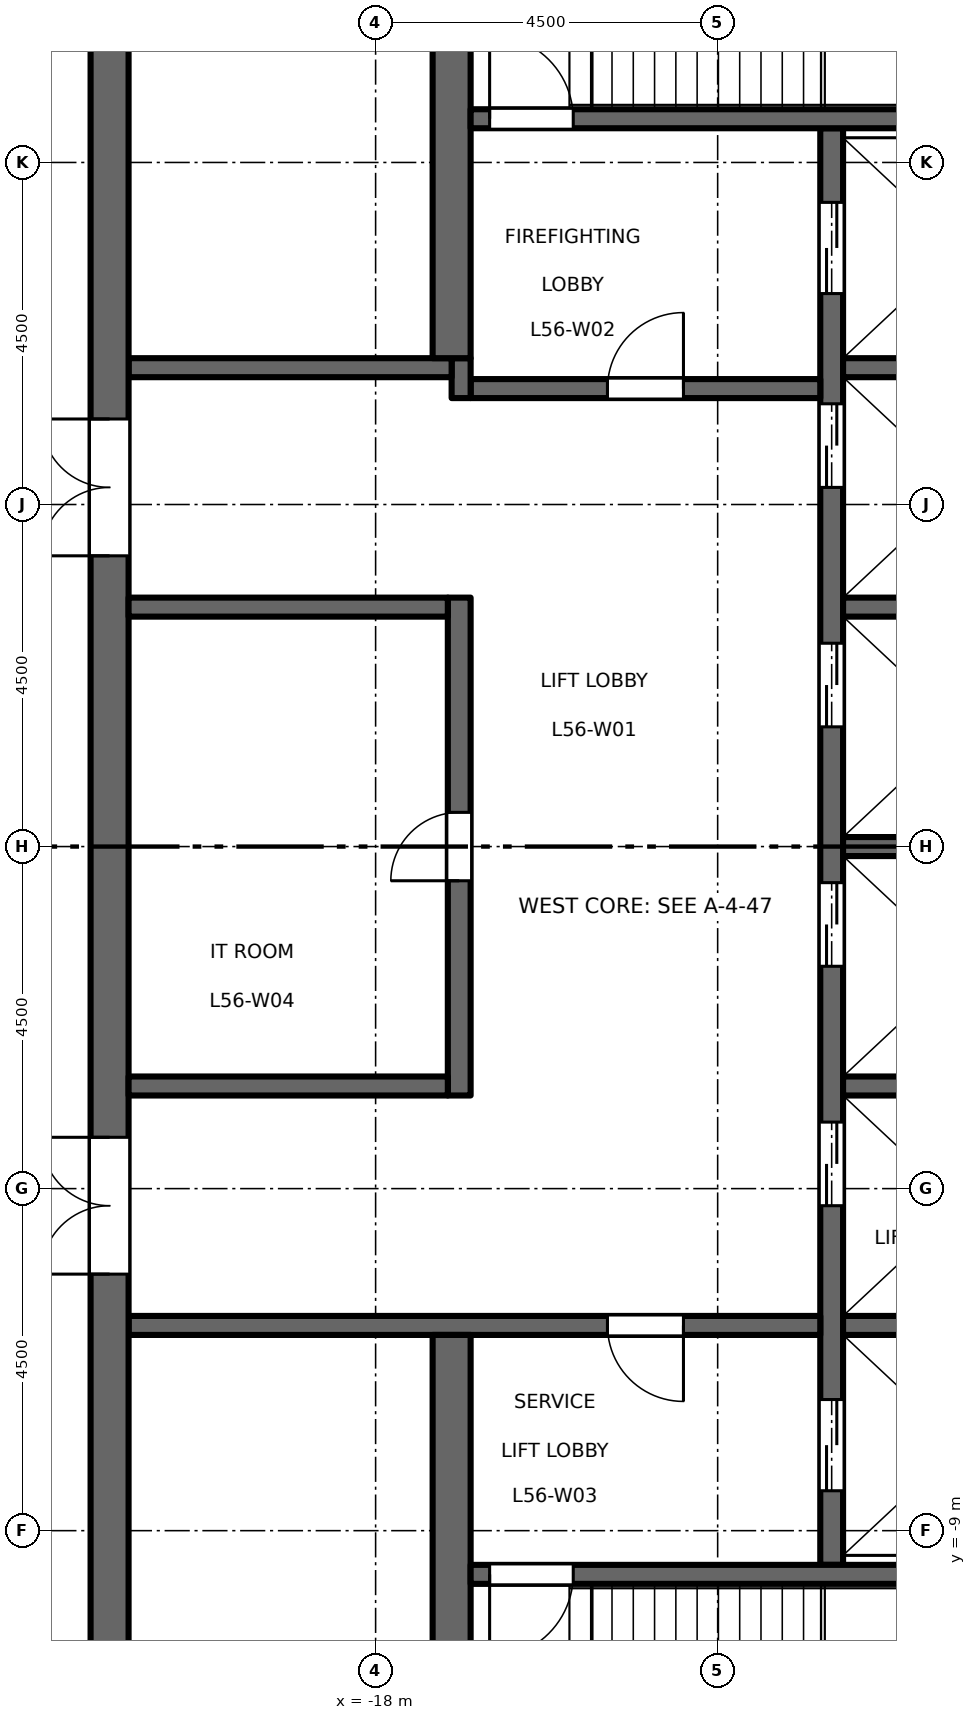
"""IFC4 building model, lengths in metres.
Left out: names, types, materials, properties, quantities, classifications, styles, units other than length and angle.
Written with IfcOpenShell. Run it as: python <this file> out.ifc"""

import sys

from ifc_helpers import new_model, si_unit, direction, frame, frame_2d, origin, place, context, subcontext, project, spatial, rectangle, extrude, element, fill, save


model = new_model("IFC4")
c1 = context("Model", 3, precision=1e-05, world=origin(), true_north=direction((0.0, 1.0)))
c2 = subcontext(c1, "Body", "Model", "MODEL_VIEW")
j1 = project(units=[si_unit("LENGTHUNIT", "METRE"), si_unit("PLANEANGLEUNIT", "RADIAN")], contexts=[c1])
p1 = place(None, origin())
s1 = spatial("IfcSite", under=j1, at=p1, CompositionType="ELEMENT")
p2 = place(p1, origin())
s2 = spatial("IfcBuilding", under=s1, at=p2, CompositionType="ELEMENT")
p3 = place(p2, frame((0.0, 0.0, 260.2)))
s3 = spatial("IfcBuildingStorey", under=s2, at=p3, CompositionType="ELEMENT", Elevation=260.2)
p4 = place(p3, frame((-12.0, -9.45, 0.0), z_axis=(0.0, 0.0, 1.0), x_axis=(0.0, 1.0, 0.0)))
e1 = element("IfcWall", 1, at=p4, inside=s3, PredefinedType="SHEAR", context=c2, shape_type="SweptSolid", body=[
    extrude(rectangle(XDim=18.9, YDim=0.3, at=frame_2d((9.45, 0.0))), origin(), (0.0, 0.0, 1.0), 4.35),
])
p5 = place(p4, frame((4.725, 0.0, 0.0)))
e2 = element("IfcOpeningElement", 2, at=p5, cuts=e1, PredefinedType="OPENING", context=c2, shape_type="SweptSolid", body=[
    extrude(rectangle(XDim=1.1, YDim=2.1, at=frame_2d((0.55, 1.05))), frame((0.0, 0.16, 0.0), z_axis=(0.0, -1.0, 0.0), x_axis=(1.0, 0.0, 0.0)), (0.0, 0.0, 1.0), 0.32),
])
p6 = place(p4, frame((7.875, 0.0, 0.0)))
e3 = element("IfcOpeningElement", 3, at=p6, cuts=e1, PredefinedType="OPENING", context=c2, shape_type="SweptSolid", body=[
    extrude(rectangle(XDim=1.1, YDim=2.1, at=frame_2d((0.55, 1.05))), frame((0.0, 0.16, 0.0), z_axis=(0.0, -1.0, 0.0), x_axis=(1.0, 0.0, 0.0)), (0.0, 0.0, 1.0), 0.32),
])
p7 = place(p4, frame((11.025, 0.0, 0.0)))
e4 = element("IfcOpeningElement", 4, at=p7, cuts=e1, PredefinedType="OPENING", context=c2, shape_type="SweptSolid", body=[
    extrude(rectangle(XDim=1.1, YDim=2.1, at=frame_2d((0.55, 1.05))), frame((0.0, 0.16, 0.0), z_axis=(0.0, -1.0, 0.0), x_axis=(1.0, 0.0, 0.0)), (0.0, 0.0, 1.0), 0.32),
])
p8 = place(p4, frame((14.175, 0.0, 0.0)))
e5 = element("IfcOpeningElement", 5, at=p8, cuts=e1, PredefinedType="OPENING", context=c2, shape_type="SweptSolid", body=[
    extrude(rectangle(XDim=1.1, YDim=2.1, at=frame_2d((0.55, 1.05))), frame((0.0, 0.16, 0.0), z_axis=(0.0, -1.0, 0.0), x_axis=(1.0, 0.0, 0.0)), (0.0, 0.0, 1.0), 0.32),
])
p9 = place(p4, frame((16.725, 0.0, 0.0)))
e6 = element("IfcOpeningElement", 6, at=p9, cuts=e1, PredefinedType="OPENING", context=c2, shape_type="SweptSolid", body=[
    extrude(rectangle(XDim=1.2, YDim=2.1, at=frame_2d((0.6, 1.05))), frame((0.0, 0.16, 0.0), z_axis=(0.0, -1.0, 0.0), x_axis=(1.0, 0.0, 0.0)), (0.0, 0.0, 1.0), 0.32),
])
p10 = place(p4, frame((0.975, 0.0, 0.0)))
e7 = element("IfcOpeningElement", 7, at=p10, cuts=e1, PredefinedType="OPENING", context=c2, shape_type="SweptSolid", body=[
    extrude(rectangle(XDim=1.2, YDim=2.1, at=frame_2d((0.6, 1.05))), frame((0.0, 0.16, 0.0), z_axis=(0.0, -1.0, 0.0), x_axis=(1.0, 0.0, 0.0)), (0.0, 0.0, 1.0), 0.32),
])
p11 = place(p3, frame((-12.15, 6.025, 0.0), z_axis=(0.0, 0.0, 1.0), x_axis=(-1.0, 0.0, 0.0)))
e8 = element("IfcWall", 8, at=p11, inside=s3, PredefinedType="SHEAR", context=c2, shape_type="SweptSolid", body=[
    extrude(rectangle(XDim=4.6, YDim=0.25, at=frame_2d((2.3, 0.0))), origin(), (0.0, 0.0, 1.0), 4.35),
])
p12 = place(p11, frame((1.8, 0.0, 0.0)))
e9 = element("IfcOpeningElement", 9, at=p12, cuts=e8, PredefinedType="OPENING", context=c2, shape_type="SweptSolid", body=[
    extrude(rectangle(XDim=1.0, YDim=2.1, at=frame_2d((0.5, 1.05))), frame((0.0, 0.135, 0.0), z_axis=(0.0, -1.0, 0.0), x_axis=(1.0, 0.0, 0.0)), (0.0, 0.0, 1.0), 0.27),
])
p13 = place(p3, frame((-16.875, 5.9, 0.0), z_axis=(0.0, 0.0, 1.0), x_axis=(0.0, 1.0, 0.0)))
e10 = element("IfcWall", 10, at=p13, inside=s3, PredefinedType="SHEAR", context=c2, shape_type="SweptSolid", body=[
    extrude(rectangle(XDim=0.525, YDim=0.25, at=frame_2d((0.263, 0.0))), origin(), (0.0, 0.0, 1.0), 4.35),
])
p14 = place(p3, frame((-17.0, 6.3, 0.0), z_axis=(0.0, 0.0, 1.0), x_axis=(-1.0, 0.0, 0.0)))
e11 = element("IfcWall", 11, at=p14, inside=s3, PredefinedType="SHEAR", context=c2, shape_type="SweptSolid", body=[
    extrude(rectangle(XDim=4.25, YDim=0.25, at=frame_2d((2.125, 0.0))), origin(), (0.0, 0.0, 1.0), 4.35),
])
p15 = place(p3, frame((-12.15, -6.3, 0.0), z_axis=(0.0, 0.0, 1.0), x_axis=(-1.0, 0.0, 0.0)))
e12 = element("IfcWall", 12, at=p15, inside=s3, PredefinedType="SHEAR", context=c2, shape_type="SweptSolid", body=[
    extrude(rectangle(XDim=9.1, YDim=0.25, at=frame_2d((4.55, 0.0))), origin(), (0.0, 0.0, 1.0), 4.35),
])
p16 = place(p15, frame((1.8, 0.0, 0.0)))
e13 = element("IfcOpeningElement", 13, at=p16, cuts=e12, PredefinedType="OPENING", context=c2, shape_type="SweptSolid", body=[
    extrude(rectangle(XDim=1.0, YDim=2.1, at=frame_2d((0.5, 1.05))), frame((0.0, 0.135, 0.0), z_axis=(0.0, -1.0, 0.0), x_axis=(1.0, 0.0, 0.0)), (0.0, 0.0, 1.0), 0.27),
])
p17 = place(p3, frame((-21.5, -13.0, 0.0), z_axis=(0.0, 0.0, 1.0), x_axis=(0.0, 1.0, 0.0)))
e14 = element("IfcWall", 14, at=p17, inside=s3, PredefinedType="SHEAR", context=c2, shape_type="SweptSolid", body=[
    extrude(rectangle(XDim=26.0, YDim=0.5, at=frame_2d((13.0, 0.0))), origin(), (0.0, 0.0, 1.0), 4.35),
])
p18 = place(p17, frame((16.825, 0.0, 0.0)))
e15 = element("IfcOpeningElement", 15, at=p18, cuts=e14, PredefinedType="OPENING", context=c2, shape_type="SweptSolid", body=[
    extrude(rectangle(XDim=1.8, YDim=2.1, at=frame_2d((0.9, 1.05))), frame((0.0, 0.26, 0.0), z_axis=(0.0, -1.0, 0.0), x_axis=(1.0, 0.0, 0.0)), (0.0, 0.0, 1.0), 0.52),
])
p19 = place(p17, frame((7.375, 0.0, 0.0)))
e16 = element("IfcOpeningElement", 16, at=p19, cuts=e14, PredefinedType="OPENING", context=c2, shape_type="SweptSolid", body=[
    extrude(rectangle(XDim=1.8, YDim=2.1, at=frame_2d((0.9, 1.05))), frame((0.0, 0.26, 0.0), z_axis=(0.0, -1.0, 0.0), x_axis=(1.0, 0.0, 0.0)), (0.0, 0.0, 1.0), 0.52),
])
p20 = place(p3, frame((-16.9, -3.275, 0.0), z_axis=(0.0, 0.0, 1.0), x_axis=(0.0, 1.0, 0.0)))
e17 = element("IfcWall", 17, at=p20, inside=s3, PredefinedType="SHEAR", context=c2, shape_type="SweptSolid", body=[
    extrude(rectangle(XDim=6.55, YDim=0.3, at=frame_2d((3.275, 0.0))), origin(), (0.0, 0.0, 1.0), 4.35),
])
p21 = place(p20, frame((2.825, 0.0, 0.0)))
e18 = element("IfcOpeningElement", 18, at=p21, cuts=e17, PredefinedType="OPENING", context=c2, shape_type="SweptSolid", body=[
    extrude(rectangle(XDim=0.9, YDim=2.1, at=frame_2d((0.45, 1.05))), frame((0.0, 0.16, 0.0), z_axis=(0.0, -1.0, 0.0), x_axis=(1.0, 0.0, 0.0)), (0.0, 0.0, 1.0), 0.32),
])
for number, where, z_axis, x_axis in (
    (19, (-17.05, 3.15, 0.0), (0.0, 0.0, 1.0), (-1.0, 0.0, 0.0)),
    (20, (-17.05, -3.15, 0.0), (0.0, 0.0, 1.0), (-1.0, 0.0, 0.0)),
):
    element("IfcWall", number, at=place(p3, frame(where, z_axis=z_axis, x_axis=x_axis)), inside=s3, PredefinedType="SHEAR", context=c2, shape_type="SweptSolid", body=[
        extrude(rectangle(XDim=4.2, YDim=0.25, at=frame_2d((2.1, 0.0))), origin(), (0.0, 0.0, 1.0), 4.35),
    ])
for number, where, z_axis, x_axis in (
    (21, (-17.0, 6.425, 0.0), (0.0, 0.0, 1.0), (0.0, 1.0, 0.0)),
    (22, (-17.0, -13.0, 0.0), (0.0, 0.0, 1.0), (0.0, 1.0, 0.0)),
):
    element("IfcWall", number, at=place(p3, frame(where, z_axis=z_axis, x_axis=x_axis)), inside=s3, PredefinedType="SHEAR", context=c2, shape_type="SweptSolid", body=[
        extrude(rectangle(XDim=6.575, YDim=0.5, at=frame_2d((3.288, 0.0))), origin(), (0.0, 0.0, 1.0), 4.35),
    ])
for number, where, z_axis, x_axis in (
    (23, (-8.75, 0.0, 0.0), (0.0, 0.0, 1.0), (-1.0, 0.0, 0.0)),
    (24, (-8.75, 3.15, 0.0), (0.0, 0.0, 1.0), (-1.0, 0.0, 0.0)),
    (25, (-8.75, 6.3, 0.0), (0.0, 0.0, 1.0), (-1.0, 0.0, 0.0)),
    (26, (-8.75, -3.15, 0.0), (0.0, 0.0, 1.0), (-1.0, 0.0, 0.0)),
    (27, (-8.75, -6.3, 0.0), (0.0, 0.0, 1.0), (-1.0, 0.0, 0.0)),
):
    element("IfcWall", number, at=place(p3, frame(where, z_axis=z_axis, x_axis=x_axis)), inside=s3, PredefinedType="SHEAR", context=c2, shape_type="SweptSolid", body=[
        extrude(rectangle(XDim=3.1, YDim=0.25, at=frame_2d((1.55, 0.0))), origin(), (0.0, 0.0, 1.0), 4.35),
    ])
p22 = place(p3, frame((-8.75, 9.575, 0.0), z_axis=(0.0, 0.0, 1.0), x_axis=(-1.0, 0.0, 0.0)))
e28 = element("IfcWall", 28, at=p22, inside=s3, PredefinedType="SHEAR", context=c2, shape_type="SweptSolid", body=[
    extrude(rectangle(XDim=8.0, YDim=0.25, at=frame_2d((4.0, 0.0))), origin(), (0.0, 0.0, 1.0), 4.35),
])
p23 = place(p22, frame((6.65, 0.0, 0.0)))
e29 = element("IfcOpeningElement", 29, at=p23, cuts=e28, PredefinedType="OPENING", context=c2, shape_type="SweptSolid", body=[
    extrude(rectangle(XDim=1.1, YDim=2.1, at=frame_2d((0.55, 1.05))), frame((0.0, 0.135, 0.0), z_axis=(0.0, -1.0, 0.0), x_axis=(1.0, 0.0, 0.0)), (0.0, 0.0, 1.0), 0.27),
])
p24 = place(p3, frame((-8.75, -9.575, 0.0), z_axis=(0.0, 0.0, 1.0), x_axis=(-1.0, 0.0, 0.0)))
e30 = element("IfcWall", 30, at=p24, inside=s3, PredefinedType="SHEAR", context=c2, shape_type="SweptSolid", body=[
    extrude(rectangle(XDim=8.0, YDim=0.25, at=frame_2d((4.0, 0.0))), origin(), (0.0, 0.0, 1.0), 4.35),
])
p25 = place(p24, frame((6.65, 0.0, 0.0)))
e31 = element("IfcOpeningElement", 31, at=p25, cuts=e30, PredefinedType="OPENING", context=c2, shape_type="SweptSolid", body=[
    extrude(rectangle(XDim=1.1, YDim=2.1, at=frame_2d((0.55, 1.05))), frame((0.0, 0.135, 0.0), z_axis=(0.0, -1.0, 0.0), x_axis=(1.0, 0.0, 0.0)), (0.0, 0.0, 1.0), 0.27),
])
p26 = place(p12, origin())
e32 = element("IfcDoor", 32, at=p26, inside=s3, OperationType="SINGLE_SWING_LEFT", PredefinedType="DOOR", context=c2, shape_type="SweptSolid", body=[
    extrude(rectangle(XDim=1.0, YDim=2.1, at=frame_2d((0.5, 1.05))), frame((0.0, 0.025, 0.0), z_axis=(0.0, -1.0, 0.0), x_axis=(1.0, 0.0, 0.0)), (0.0, 0.0, 1.0), 0.05),
])
fill(e9, e32)
p27 = place(p16, origin())
e33 = element("IfcDoor", 33, at=p27, inside=s3, OperationType="SINGLE_SWING_RIGHT", PredefinedType="DOOR", context=c2, shape_type="SweptSolid", body=[
    extrude(rectangle(XDim=1.0, YDim=2.1, at=frame_2d((0.5, 1.05))), frame((0.0, 0.025, 0.0), z_axis=(0.0, -1.0, 0.0), x_axis=(1.0, 0.0, 0.0)), (0.0, 0.0, 1.0), 0.05),
])
fill(e13, e33)
p28 = place(p23, origin())
e34 = element("IfcDoor", 34, at=p28, inside=s3, OperationType="SINGLE_SWING_RIGHT", PredefinedType="DOOR", context=c2, shape_type="SweptSolid", body=[
    extrude(rectangle(XDim=1.1, YDim=2.1, at=frame_2d((0.55, 1.05))), frame((0.0, 0.025, 0.0), z_axis=(0.0, -1.0, 0.0), x_axis=(1.0, 0.0, 0.0)), (0.0, 0.0, 1.0), 0.05),
])
fill(e29, e34)
p29 = place(p25, origin())
e35 = element("IfcDoor", 35, at=p29, inside=s3, OperationType="SINGLE_SWING_LEFT", PredefinedType="DOOR", context=c2, shape_type="SweptSolid", body=[
    extrude(rectangle(XDim=1.1, YDim=2.1, at=frame_2d((0.55, 1.05))), frame((0.0, 0.025, 0.0), z_axis=(0.0, -1.0, 0.0), x_axis=(1.0, 0.0, 0.0)), (0.0, 0.0, 1.0), 0.05),
])
fill(e31, e35)
p30 = place(p18, origin())
e36 = element("IfcDoor", 36, at=p30, inside=s3, OperationType="DOUBLE_DOOR_DOUBLE_SWING", PredefinedType="DOOR", context=c2, shape_type="SweptSolid", body=[
    extrude(rectangle(XDim=1.8, YDim=2.1, at=frame_2d((0.9, 1.05))), frame((0.0, 0.025, 0.0), z_axis=(0.0, -1.0, 0.0), x_axis=(1.0, 0.0, 0.0)), (0.0, 0.0, 1.0), 0.05),
])
fill(e15, e36)
p31 = place(p19, origin())
e37 = element("IfcDoor", 37, at=p31, inside=s3, OperationType="DOUBLE_DOOR_DOUBLE_SWING", PredefinedType="DOOR", context=c2, shape_type="SweptSolid", body=[
    extrude(rectangle(XDim=1.8, YDim=2.1, at=frame_2d((0.9, 1.05))), frame((0.0, 0.025, 0.0), z_axis=(0.0, -1.0, 0.0), x_axis=(1.0, 0.0, 0.0)), (0.0, 0.0, 1.0), 0.05),
])
fill(e16, e37)
p32 = place(p5, origin())
e38 = element("IfcDoor", 38, at=p32, inside=s3, OperationType="DOUBLE_DOOR_SLIDING", PredefinedType="DOOR", context=c2, shape_type="SweptSolid", body=[
    extrude(rectangle(XDim=1.1, YDim=2.1, at=frame_2d((0.55, 1.05))), frame((0.0, 0.025, 0.0), z_axis=(0.0, -1.0, 0.0), x_axis=(1.0, 0.0, 0.0)), (0.0, 0.0, 1.0), 0.05),
])
fill(e2, e38)
p33 = place(p6, origin())
e39 = element("IfcDoor", 39, at=p33, inside=s3, OperationType="DOUBLE_DOOR_SLIDING", PredefinedType="DOOR", context=c2, shape_type="SweptSolid", body=[
    extrude(rectangle(XDim=1.1, YDim=2.1, at=frame_2d((0.55, 1.05))), frame((0.0, 0.025, 0.0), z_axis=(0.0, -1.0, 0.0), x_axis=(1.0, 0.0, 0.0)), (0.0, 0.0, 1.0), 0.05),
])
fill(e3, e39)
p34 = place(p7, origin())
e40 = element("IfcDoor", 40, at=p34, inside=s3, OperationType="DOUBLE_DOOR_SLIDING", PredefinedType="DOOR", context=c2, shape_type="SweptSolid", body=[
    extrude(rectangle(XDim=1.1, YDim=2.1, at=frame_2d((0.55, 1.05))), frame((0.0, 0.025, 0.0), z_axis=(0.0, -1.0, 0.0), x_axis=(1.0, 0.0, 0.0)), (0.0, 0.0, 1.0), 0.05),
])
fill(e4, e40)
p35 = place(p8, origin())
e41 = element("IfcDoor", 41, at=p35, inside=s3, OperationType="DOUBLE_DOOR_SLIDING", PredefinedType="DOOR", context=c2, shape_type="SweptSolid", body=[
    extrude(rectangle(XDim=1.1, YDim=2.1, at=frame_2d((0.55, 1.05))), frame((0.0, 0.025, 0.0), z_axis=(0.0, -1.0, 0.0), x_axis=(1.0, 0.0, 0.0)), (0.0, 0.0, 1.0), 0.05),
])
fill(e5, e41)
p36 = place(p9, origin())
e42 = element("IfcDoor", 42, at=p36, inside=s3, OperationType="DOUBLE_DOOR_SLIDING", PredefinedType="DOOR", context=c2, shape_type="SweptSolid", body=[
    extrude(rectangle(XDim=1.2, YDim=2.1, at=frame_2d((0.6, 1.05))), frame((0.0, 0.025, 0.0), z_axis=(0.0, -1.0, 0.0), x_axis=(1.0, 0.0, 0.0)), (0.0, 0.0, 1.0), 0.05),
])
fill(e6, e42)
p37 = place(p10, origin())
e43 = element("IfcDoor", 43, at=p37, inside=s3, OperationType="DOUBLE_DOOR_SLIDING", PredefinedType="DOOR", context=c2, shape_type="SweptSolid", body=[
    extrude(rectangle(XDim=1.2, YDim=2.1, at=frame_2d((0.6, 1.05))), frame((0.0, 0.025, 0.0), z_axis=(0.0, -1.0, 0.0), x_axis=(1.0, 0.0, 0.0)), (0.0, 0.0, 1.0), 0.05),
])
fill(e7, e43)
p38 = place(p21, origin())
e44 = element("IfcDoor", 44, at=p38, inside=s3, OperationType="SINGLE_SWING_RIGHT", PredefinedType="DOOR", context=c2, shape_type="SweptSolid", body=[
    extrude(rectangle(XDim=0.9, YDim=2.1, at=frame_2d((0.45, 1.05))), frame((0.0, 0.025, 0.0), z_axis=(0.0, -1.0, 0.0), x_axis=(1.0, 0.0, 0.0)), (0.0, 0.0, 1.0), 0.05),
])
fill(e18, e44)
save(model, sys.argv[1])
